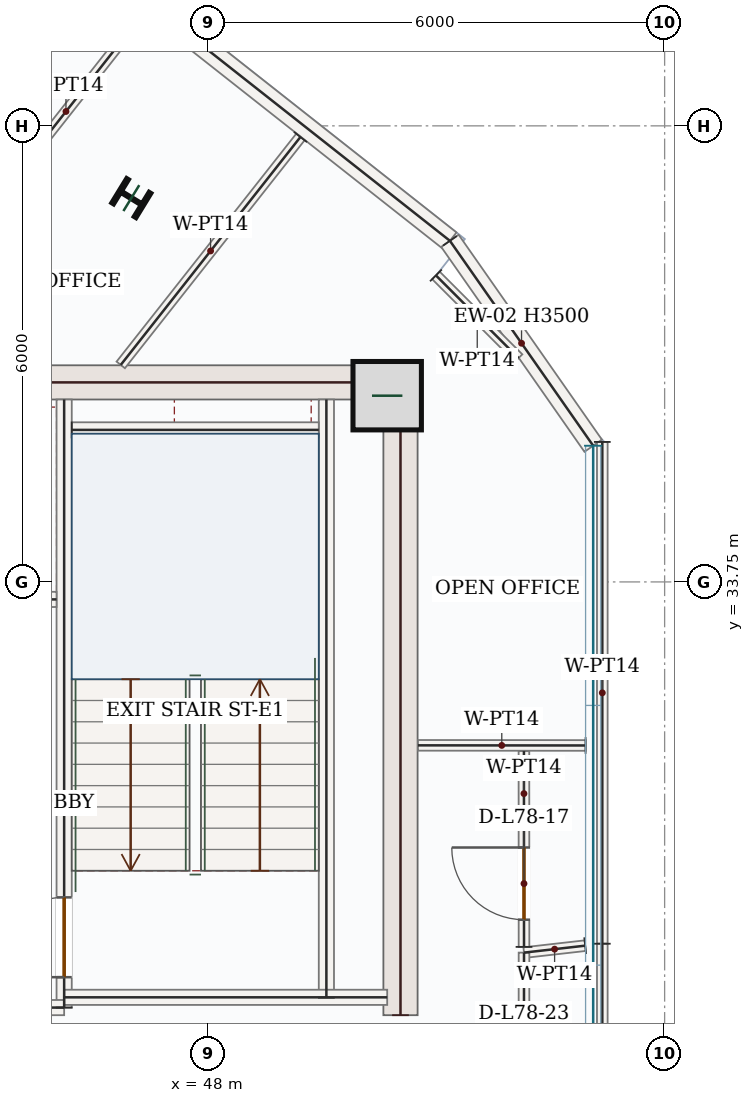
"""IFC4 building model, lengths in metres.
Left out: names, types, materials, properties, quantities, classifications, styles, units other than length and angle.
Written with IfcOpenShell. Run it as: python <this file> out.ifc"""

import sys

from ifc_helpers import new_model, si_unit, direction, frame, frame_2d, origin, origin_2d, place, context, subcontext, project, spatial, rectangle, i_section, extrude, source, transform, mapped, element, fill, save


model = new_model("IFC4")
c1 = context("Model", 3, precision=1e-05, world=origin(), true_north=direction((0.0, 1.0)))
c2 = subcontext(c1, "Body", "Model", "MODEL_VIEW")
j1 = project(units=[si_unit("LENGTHUNIT", "METRE"), si_unit("PLANEANGLEUNIT", "RADIAN")], contexts=[c1])
p1 = place(None, origin())
s1 = spatial("IfcSite", under=j1, at=p1, CompositionType="ELEMENT")
p2 = place(p1, origin())
s2 = spatial("IfcBuilding", under=s1, at=p2, CompositionType="ELEMENT")
p3 = place(p2, frame((0.0, 0.0, 323.55)))
s3 = spatial("IfcBuildingStorey", under=s2, at=p3, CompositionType="ELEMENT", Elevation=323.55)
m1 = source(origin(), c2, "Body", "SweptSolid", [
    extrude(rectangle(XDim=8.55, YDim=0.45, at=frame_2d((4.275, 0.0))), origin(), (0.0, 0.0, 1.0), 3.5),
])
p4 = place(p3, frame((50.525, 28.05, 0.0), z_axis=(0.0, 0.0, 1.0), x_axis=(0.0, 1.0, 0.0)))
e1 = element("IfcWall", 1, at=p4, inside=s3, PredefinedType="SHEAR", context=c2, shape_type="MappedRepresentation", body=[
    mapped(m1, transform((0.0, 0.0, 0.0), x_axis=(1.0, 0.0, 0.0), y_axis=(0.0, 1.0, 0.0), z_axis=(0.0, 0.0, 1.0), scale=1.0)),
])
m2 = source(origin(), c2, "Body", "SweptSolid", [
    extrude(rectangle(XDim=7.1, YDim=0.45, at=frame_2d((3.55, 0.0))), origin(), (0.0, 0.0, 1.0), 3.5),
])
p5 = place(p3, frame((43.2, 36.375, 0.0), z_axis=(0.0, 0.0, 1.0), x_axis=(1.0, 0.0, 0.0)))
e2 = element("IfcWall", 2, at=p5, inside=s3, PredefinedType="SHEAR", context=c2, shape_type="MappedRepresentation", body=[
    mapped(m2, transform((0.0, 0.0, 0.0), x_axis=(1.0, 0.0, 0.0), y_axis=(0.0, 1.0, 0.0), z_axis=(0.0, 0.0, 1.0), scale=1.0)),
])
m3 = source(origin(), c2, "Body", "SweptSolid", [
    extrude(rectangle(XDim=0.9, YDim=0.9, at=origin_2d()), origin(), (0.0, 0.0, 1.0), 3.75),
])
p6 = place(p3, frame((50.35, 36.2, 0.0), z_axis=(0.0, 0.0, 1.0), x_axis=(1.0, 0.0, 0.0)))
e3 = element("IfcColumn", 3, at=p6, inside=s3, PredefinedType="COLUMN", context=c2, shape_type="MappedRepresentation", body=[
    mapped(m3, transform((0.0, 0.0, 0.0), x_axis=(1.0, 0.0, 0.0), y_axis=(0.0, 1.0, 0.0), z_axis=(0.0, 0.0, 1.0), scale=1.0)),
])
m4 = source(origin(), c2, "Body", "SweptSolid", [
    extrude(i_section(OverallWidth=0.374, OverallDepth=0.372, WebThickness=0.016, FlangeThickness=0.026, FilletRadius=0.018, at=origin_2d()), origin(), (0.0, 0.0, 1.0), 3.75),
])
p7 = place(p3, frame((46.984, 38.8, 0.0), z_axis=(0.0, 0.0, 1.0), x_axis=(0.522498564716, 0.852640164354, 0.0)))
e4 = element("IfcColumn", 4, at=p7, inside=s3, PredefinedType="COLUMN", context=c2, shape_type="MappedRepresentation", body=[
    mapped(m4, transform((0.0, 0.0, 0.0), x_axis=(1.0, 0.0, 0.0), y_axis=(0.0, 1.0, 0.0), z_axis=(0.0, 0.0, 1.0), scale=1.0)),
])
m5 = source(origin(), c2, "Body", "SweptSolid", [
    extrude(rectangle(XDim=9.92, YDim=0.28, at=frame_2d((4.96, 0.0))), origin(), (0.0, 0.0, 1.0), 3.5),
])
p8 = place(p3, frame((43.385, 44.379, 0.0), z_axis=(0.0, 0.0, 1.0), x_axis=(0.785317257435, -0.619093535077, 0.0)))
e5 = element("IfcWall", 5, at=p8, inside=s3, PredefinedType="SOLIDWALL", context=c2, shape_type="MappedRepresentation", body=[
    mapped(m5, transform((0.0, 0.0, 0.0), x_axis=(1.0, 0.0, 0.0), y_axis=(0.0, 1.0, 0.0), z_axis=(0.0, 0.0, 1.0), scale=1.0)),
])
m6 = source(origin(), c2, "Body", "SweptSolid", [
    extrude(rectangle(XDim=3.29, YDim=0.28, at=frame_2d((1.645, 0.0))), origin(), (0.0, 0.0, 1.0), 3.5),
])
p9 = place(p3, frame((51.175, 38.238, 0.0), z_axis=(0.0, 0.0, 1.0), x_axis=(0.573043854491, -0.819524704222, 0.0)))
e6 = element("IfcWall", 6, at=p9, inside=s3, PredefinedType="SOLIDWALL", context=c2, shape_type="MappedRepresentation", body=[
    mapped(m6, transform((0.0, 0.0, 0.0), x_axis=(1.0, 0.0, 0.0), y_axis=(0.0, 1.0, 0.0), z_axis=(0.0, 0.0, 1.0), scale=1.0)),
])
m7 = source(origin(), c2, "Body", "SweptSolid", [
    extrude(rectangle(XDim=7.87, YDim=0.2, at=frame_2d((3.935, 0.0))), origin(), (0.0, 0.0, 1.0), 3.5),
])
p10 = place(p3, frame((49.55, 28.28, 0.0), z_axis=(0.0, 0.0, 1.0), x_axis=(0.0, 1.0, 0.0)))
e7 = element("IfcWall", 7, at=p10, inside=s3, PredefinedType="SOLIDWALL", context=c2, shape_type="MappedRepresentation", body=[
    mapped(m7, transform((0.0, 0.0, 0.0), x_axis=(1.0, 0.0, 0.0), y_axis=(0.0, 1.0, 0.0), z_axis=(0.0, 0.0, 1.0), scale=1.0)),
])
p11 = place(p3, frame((46.1, 28.15, 0.0), z_axis=(0.0, 0.0, 1.0), x_axis=(0.0, 1.0, 0.0)))
e8 = element("IfcWall", 8, at=p11, inside=s3, PredefinedType="SOLIDWALL", context=c2, shape_type="SweptSolid", body=[
    extrude(rectangle(XDim=8.0, YDim=0.2, at=frame_2d((4.0, 0.0))), origin(), (0.0, 0.0, 1.0), 3.5),
])
p12 = place(p11, frame((0.4, 0.0, 0.0)))
e9 = element("IfcOpeningElement", 9, at=p12, cuts=e8, PredefinedType="OPENING", context=c2, shape_type="SweptSolid", body=[
    extrude(rectangle(XDim=1.05, YDim=2.15, at=frame_2d((0.525, 1.075))), frame((0.0, 0.11, 0.0), z_axis=(0.0, -1.0, 0.0), x_axis=(1.0, 0.0, 0.0)), (0.0, 0.0, 1.0), 0.22),
])
m8 = source(origin(), c2, "Body", "SweptSolid", [
    extrude(rectangle(XDim=3.0, YDim=0.2, at=frame_2d((1.5, 0.0))), origin(), (0.0, 0.0, 1.0), 3.5),
])
p13 = place(p3, frame((43.1, 28.15, 0.0), z_axis=(0.0, 0.0, 1.0), x_axis=(1.0, 0.0, 0.0)))
e10 = element("IfcWall", 10, at=p13, inside=s3, PredefinedType="SOLIDWALL", context=c2, shape_type="MappedRepresentation", body=[
    mapped(m8, transform((0.0, 0.0, 0.0), x_axis=(1.0, 0.0, 0.0), y_axis=(0.0, 1.0, 0.0), z_axis=(0.0, 0.0, 1.0), scale=1.0)),
])
m9 = source(origin(), c2, "Body", "SweptSolid", [
    extrude(rectangle(XDim=4.25, YDim=0.2, at=frame_2d((2.125, 0.0))), origin(), (0.0, 0.0, 1.0), 3.5),
])
p14 = place(p3, frame((46.1, 28.285, 0.0), z_axis=(0.0, 0.0, 1.0), x_axis=(1.0, 0.0, 0.0)))
e11 = element("IfcWall", 11, at=p14, inside=s3, PredefinedType="SOLIDWALL", context=c2, shape_type="MappedRepresentation", body=[
    mapped(m9, transform((0.0, 0.0, 0.0), x_axis=(1.0, 0.0, 0.0), y_axis=(0.0, 1.0, 0.0), z_axis=(0.0, 0.0, 1.0), scale=1.0)),
])
m10 = source(origin(), c2, "Body", "SweptSolid", [
    extrude(rectangle(XDim=3.25, YDim=0.2, at=frame_2d((1.625, 0.0))), origin(), (0.0, 0.0, 1.0), 3.5),
])
p15 = place(p3, frame((46.2, 35.75, 0.0), z_axis=(0.0, 0.0, 1.0), x_axis=(1.0, 0.0, 0.0)))
e12 = element("IfcWall", 12, at=p15, inside=s3, PredefinedType="SOLIDWALL", context=c2, shape_type="MappedRepresentation", body=[
    mapped(m10, transform((0.0, 0.0, 0.0), x_axis=(1.0, 0.0, 0.0), y_axis=(0.0, 1.0, 0.0), z_axis=(0.0, 0.0, 1.0), scale=1.0)),
])
p16 = place(p3, frame((43.25, 33.52, 0.0), z_axis=(0.0, 0.0, 1.0), x_axis=(1.0, 0.0, 0.0)))
e13 = element("IfcWall", 13, at=p16, inside=s3, PredefinedType="SOLIDWALL", context=c2, shape_type="SweptSolid", body=[
    extrude(rectangle(XDim=2.75, YDim=0.2, at=frame_2d((1.375, 0.0))), origin(), (0.0, 0.0, 1.0), 3.5),
])
p17 = place(p16, frame((0.82, 0.0, 0.0)))
e14 = element("IfcOpeningElement", 14, at=p17, cuts=e13, PredefinedType="OPENING", context=c2, shape_type="SweptSolid", body=[
    extrude(rectangle(XDim=1.1, YDim=2.15, at=frame_2d((0.55, 1.075))), frame((0.0, 0.11, 0.0), z_axis=(0.0, -1.0, 0.0), x_axis=(1.0, 0.0, 0.0)), (0.0, 0.0, 1.0), 0.22),
])
m11 = source(origin(), c2, "Body", "SweptSolid", [
    extrude(rectangle(XDim=3.818, YDim=0.14, at=frame_2d((1.909, 0.0))), origin(), (0.0, 0.0, 1.0), 3.5),
])
p18 = place(p3, frame((49.208, 39.604, 0.0), z_axis=(0.0, 0.0, 1.0), x_axis=(-0.619119655452, -0.78529666511, 0.0)))
e15 = element("IfcWall", 15, at=p18, inside=s3, PredefinedType="PARTITIONING", context=c2, shape_type="MappedRepresentation", body=[
    mapped(m11, transform((0.0, 0.0, 0.0), x_axis=(1.0, 0.0, 0.0), y_axis=(0.0, 1.0, 0.0), z_axis=(0.0, 0.0, 1.0), scale=1.0)),
])
p19 = place(p3, frame((43.823, 37.02, 0.0), z_axis=(0.0, 0.0, 1.0), x_axis=(0.619105408422, 0.785307897109, 0.0)))
e16 = element("IfcWall", 16, at=p19, inside=s3, PredefinedType="PARTITIONING", context=c2, shape_type="SweptSolid", body=[
    extrude(rectangle(XDim=5.363, YDim=0.14, at=frame_2d((2.682, 0.0))), origin(), (0.0, 0.0, 1.0), 3.5),
])
p20 = place(p19, frame((0.971, 0.0, 0.0)))
e17 = element("IfcOpeningElement", 17, at=p20, cuts=e16, PredefinedType="OPENING", context=c2, shape_type="SweptSolid", body=[
    extrude(rectangle(XDim=0.95, YDim=2.15, at=frame_2d((0.475, 1.075))), frame((0.0, 0.08, 0.0), z_axis=(0.0, -1.0, 0.0), x_axis=(1.0, 0.0, 0.0)), (0.0, 0.0, 1.0), 0.16),
])
m12 = source(origin(), c2, "Body", "SweptSolid", [
    extrude(rectangle(XDim=2.205, YDim=0.14, at=frame_2d((1.103, 0.0))), origin(), (0.0, 0.0, 1.0), 3.5),
])
p21 = place(p3, frame((52.96, 31.598, 0.0), z_axis=(0.0, 0.0, 1.0), x_axis=(-0.99999969967, 0.000775021911, 0.0)))
e18 = element("IfcWall", 18, at=p21, inside=s3, PredefinedType="PARTITIONING", context=c2, shape_type="MappedRepresentation", body=[
    mapped(m12, transform((0.0, 0.0, 0.0), x_axis=(1.0, 0.0, 0.0), y_axis=(0.0, 1.0, 0.0), z_axis=(0.0, 0.0, 1.0), scale=1.0)),
])
m13 = source(origin(), c2, "Body", "SweptSolid", [
    extrude(rectangle(XDim=1.538, YDim=0.14, at=frame_2d((0.769, 0.0))), origin(), (0.0, 0.0, 1.0), 3.5),
])
p22 = place(p3, frame((50.991, 37.783, 0.0), z_axis=(0.0, 0.0, 1.0), x_axis=(0.706709909315, -0.707503430434, 0.0)))
e19 = element("IfcWall", 19, at=p22, inside=s3, PredefinedType="PARTITIONING", context=c2, shape_type="MappedRepresentation", body=[
    mapped(m13, transform((0.0, 0.0, 0.0), x_axis=(1.0, 0.0, 0.0), y_axis=(0.0, 1.0, 0.0), z_axis=(0.0, 0.0, 1.0), scale=1.0)),
])
m14 = source(origin(), c2, "Body", "SweptSolid", [
    extrude(rectangle(XDim=6.602, YDim=0.14, at=frame_2d((3.301, 0.0))), origin(), (0.0, 0.0, 1.0), 3.5),
])
p23 = place(p3, frame((53.18, 35.592, 0.0), z_axis=(0.0, 0.0, 1.0), x_axis=(0.0, -1.0, 0.0)))
e20 = element("IfcWall", 20, at=p23, inside=s3, PredefinedType="PARTITIONING", context=c2, shape_type="MappedRepresentation", body=[
    mapped(m14, transform((0.0, 0.0, 0.0), x_axis=(1.0, 0.0, 0.0), y_axis=(0.0, 1.0, 0.0), z_axis=(0.0, 0.0, 1.0), scale=1.0)),
])
m15 = source(origin(), c2, "Body", "SweptSolid", [
    extrude(rectangle(XDim=0.81, YDim=0.14, at=frame_2d((0.405, 0.0))), origin(), (0.0, 0.0, 1.0), 3.5),
])
p24 = place(p3, frame((52.955, 28.965, 0.0), z_axis=(0.0, 0.0, 1.0), x_axis=(-0.99359757088, -0.112977285955, 0.0)))
e21 = element("IfcWall", 21, at=p24, inside=s3, PredefinedType="PARTITIONING", context=c2, shape_type="MappedRepresentation", body=[
    mapped(m15, transform((0.0, 0.0, 0.0), x_axis=(1.0, 0.0, 0.0), y_axis=(0.0, 1.0, 0.0), z_axis=(0.0, 0.0, 1.0), scale=1.0)),
])
p25 = place(p3, frame((52.15, 28.948, 0.0), z_axis=(0.0, 0.0, 1.0), x_axis=(-0.000379182834, 0.99999992811, 0.0)))
e22 = element("IfcWall", 22, at=p25, inside=s3, PredefinedType="PARTITIONING", context=c2, shape_type="SweptSolid", body=[
    extrude(rectangle(XDim=2.575, YDim=0.14, at=frame_2d((1.288, 0.0))), origin(), (0.0, 0.0, 1.0), 3.5),
])
p26 = place(p25, frame((0.358, 0.0, 0.0)))
e23 = element("IfcOpeningElement", 23, at=p26, cuts=e22, PredefinedType="OPENING", context=c2, shape_type="SweptSolid", body=[
    extrude(rectangle(XDim=0.95, YDim=2.15, at=frame_2d((0.475, 1.075))), frame((0.0, 0.08, 0.0), z_axis=(0.0, -1.0, 0.0), x_axis=(1.0, 0.0, 0.0)), (0.0, 0.0, 1.0), 0.16),
])
p27 = place(p3, frame((52.147, 22.477, 0.0), z_axis=(0.0, 0.0, 1.0), x_axis=(0.0003817085, 0.999999927149, 0.0)))
e24 = element("IfcWall", 24, at=p27, inside=s3, PredefinedType="PARTITIONING", context=c2, shape_type="SweptSolid", body=[
    extrude(rectangle(XDim=6.396, YDim=0.14, at=frame_2d((3.198, 0.0))), origin(), (0.0, 0.0, 1.0), 3.5),
])
p28 = place(p27, frame((4.248, 0.0, 0.0)))
e25 = element("IfcOpeningElement", 25, at=p28, cuts=e24, PredefinedType="OPENING", context=c2, shape_type="SweptSolid", body=[
    extrude(rectangle(XDim=0.95, YDim=2.15, at=frame_2d((0.475, 1.075))), frame((0.0, 0.08, 0.0), z_axis=(0.0, -1.0, 0.0), x_axis=(1.0, 0.0, 0.0)), (0.0, 0.0, 1.0), 0.16),
])
m16 = source(origin(), c2, "Body", "SweptSolid", [
    extrude(rectangle(XDim=6.881, YDim=0.14, at=frame_2d((3.441, 0.0))), origin(), (0.0, 0.0, 1.0), 3.5),
])
p29 = place(p3, frame((53.18, 28.99, 0.0), z_axis=(0.0, 0.0, 1.0), x_axis=(0.0, -1.0, 0.0)))
e26 = element("IfcWall", 26, at=p29, inside=s3, PredefinedType="PARTITIONING", context=c2, shape_type="MappedRepresentation", body=[
    mapped(m16, transform((0.0, 0.0, 0.0), x_axis=(1.0, 0.0, 0.0), y_axis=(0.0, 1.0, 0.0), z_axis=(0.0, 0.0, 1.0), scale=1.0)),
])
m17 = source(origin(), c2, "Body", "SweptSolid", [
    extrude(rectangle(XDim=1.05, YDim=2.15, at=frame_2d((0.525, 1.075))), frame((0.0, 0.025, 0.0), z_axis=(0.0, -1.0, 0.0), x_axis=(1.0, 0.0, 0.0)), (0.0, 0.0, 1.0), 0.05),
])
p30 = place(p12, origin())
e27 = element("IfcDoor", 27, at=p30, inside=s3, OperationType="SINGLE_SWING_LEFT", PredefinedType="DOOR", context=c2, shape_type="MappedRepresentation", body=[
    mapped(m17, transform((0.0, 0.0, 0.0), x_axis=(1.0, 0.0, 0.0), y_axis=(0.0, 1.0, 0.0), z_axis=(0.0, 0.0, 1.0), scale=1.0)),
])
fill(e9, e27)
m18 = source(origin(), c2, "Body", "SweptSolid", [
    extrude(rectangle(XDim=0.95, YDim=2.15, at=frame_2d((0.475, 1.075))), frame((0.0, 0.025, 0.0), z_axis=(0.0, -1.0, 0.0), x_axis=(1.0, 0.0, 0.0)), (0.0, 0.0, 1.0), 0.05),
])
p31 = place(p26, origin())
e28 = element("IfcDoor", 28, at=p31, inside=s3, OperationType="SINGLE_SWING_RIGHT", PredefinedType="DOOR", context=c2, shape_type="MappedRepresentation", body=[
    mapped(m18, transform((0.0, 0.0, 0.0), x_axis=(1.0, 0.0, 0.0), y_axis=(0.0, 1.0, 0.0), z_axis=(0.0, 0.0, 1.0), scale=1.0)),
])
fill(e23, e28)
save(model, sys.argv[1])
